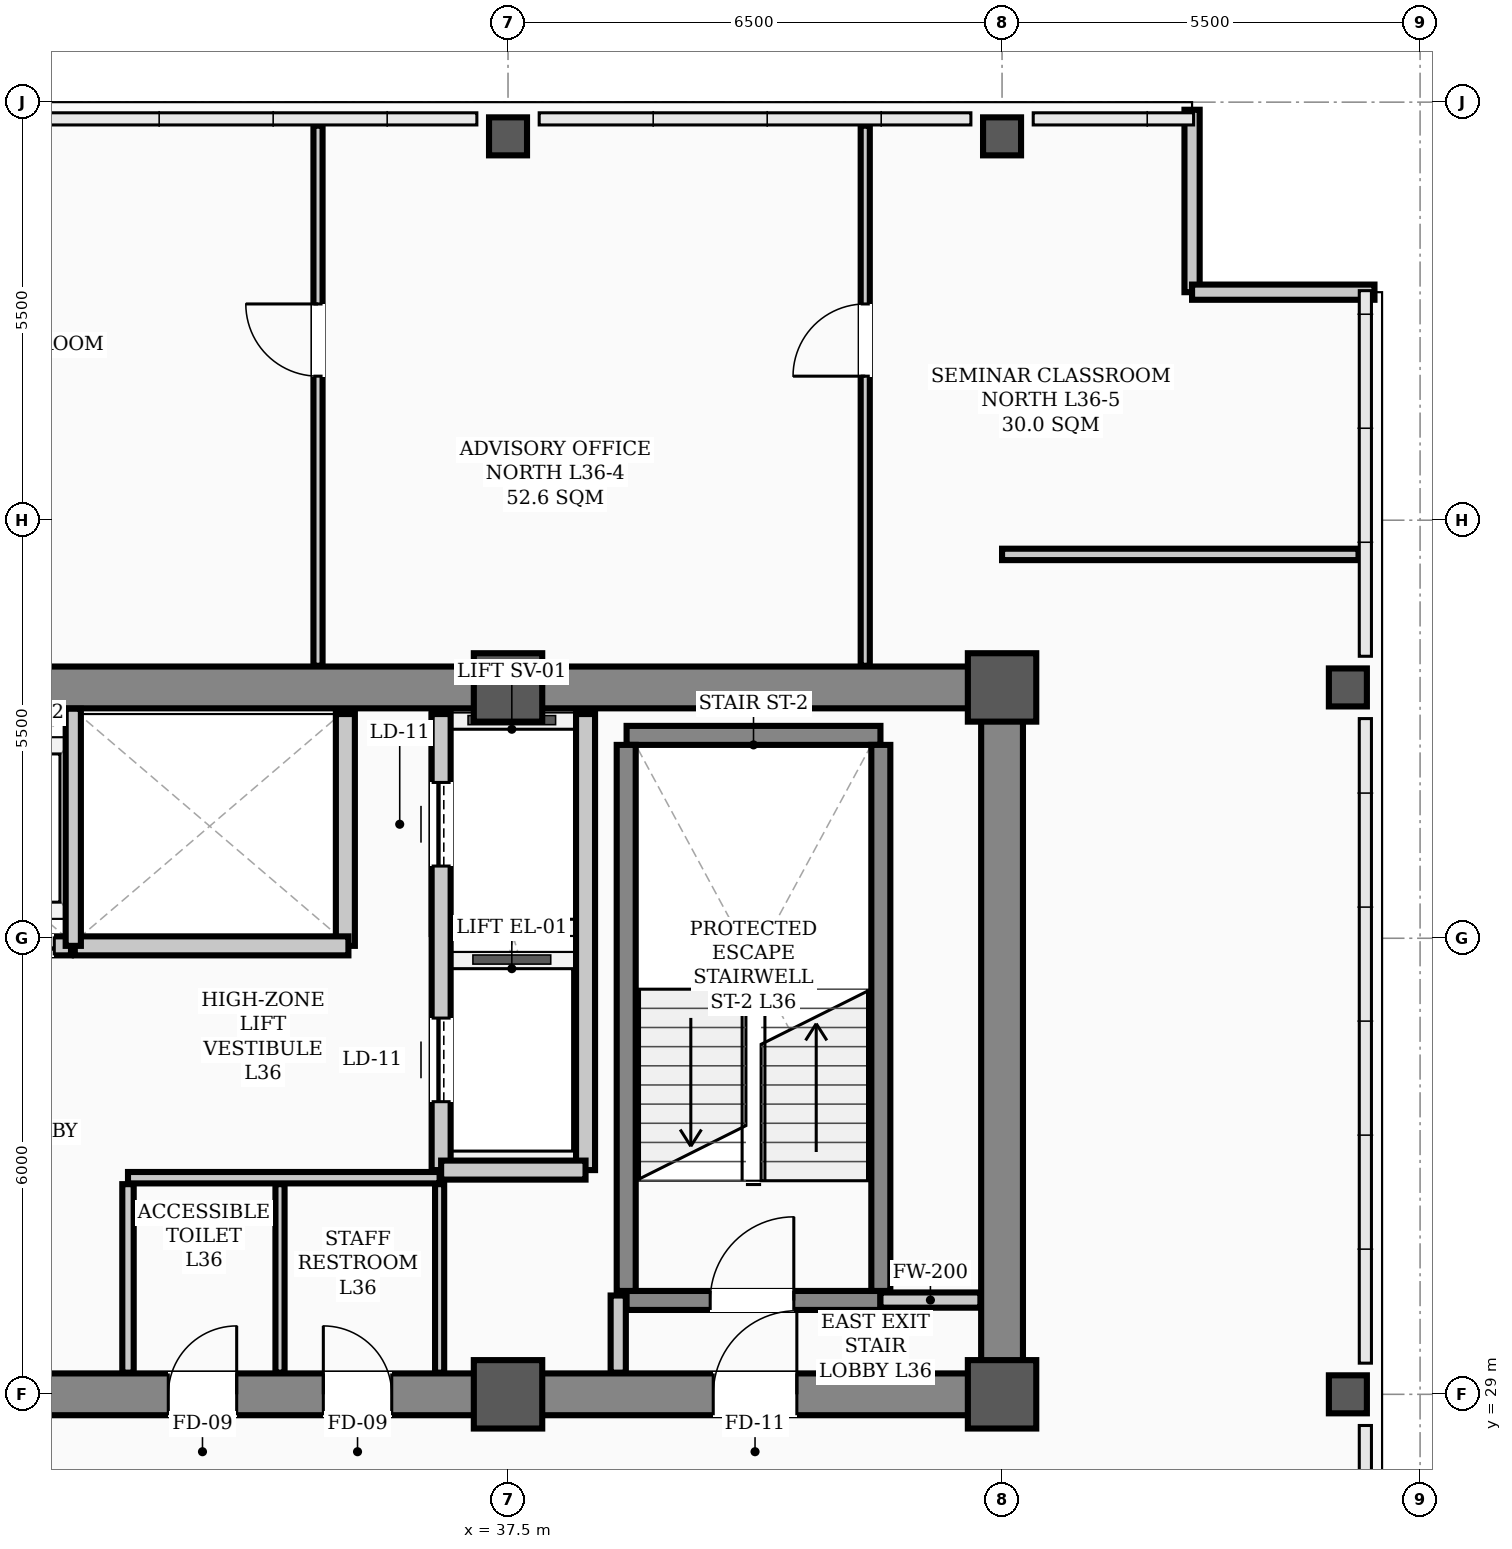
"""IFC4 building model, lengths in metres.
Left out: names, types, materials, properties, quantities, classifications, styles, units other than length and angle.
Written with IfcOpenShell. Run it as: python <this file> out.ifc"""

import sys

from ifc_helpers import new_model, si_unit, direction, frame, frame_2d, origin, origin_2d, place, context, subcontext, project, spatial, rectangle, hollow_rectangle, extrude, element, fill, save


model = new_model("IFC4")
c1 = context("Model", 3, precision=1e-05, world=origin(), true_north=direction((0.0, 1.0)))
c2 = subcontext(c1, "Body", "Model", "MODEL_VIEW")
j1 = project(units=[si_unit("LENGTHUNIT", "METRE"), si_unit("PLANEANGLEUNIT", "RADIAN")], contexts=[c1])
p1 = place(None, origin())
s1 = spatial("IfcSite", under=j1, at=p1, CompositionType="ELEMENT")
p2 = place(p1, origin())
s2 = spatial("IfcBuilding", under=s1, at=p2, CompositionType="ELEMENT")
p3 = place(p2, frame((0.0, 0.0, 146.1)))
s3 = spatial("IfcBuildingStorey", under=s2, at=p3, CompositionType="ELEMENT", Elevation=146.1)
for number, where, z_axis, x_axis in (
    (1, (37.5, 29.0, 0.0), (0.0, 0.0, 1.0), (1.0, 0.0, 0.0)),
    (2, (37.5, 38.3, 0.0), (0.0, 0.0, 1.0), (1.0, 0.0, 0.0)),
    (3, (44.0, 29.0, 0.0), (0.0, 0.0, 1.0), (1.0, 0.0, 0.0)),
    (4, (44.0, 38.3, 0.0), (0.0, 0.0, 1.0), (1.0, 0.0, 0.0)),
):
    element("IfcColumn", number, at=place(p3, frame(where, z_axis=z_axis, x_axis=x_axis)), inside=s3, PredefinedType="COLUMN", context=c2, shape_type="SweptSolid", body=[
        extrude(hollow_rectangle(XDim=0.9, YDim=0.9, WallThickness=0.035, InnerFilletRadius=0.017, OuterFilletRadius=0.052, at=origin_2d()), origin(), (0.0, 0.0, 1.0), 3.9),
    ])
for number, where, z_axis, x_axis in (
    (5, (37.5, 45.55, 0.0), (0.0, 0.0, 1.0), (1.0, 0.0, 0.0)),
    (6, (44.0, 45.55, 0.0), (0.0, 0.0, 1.0), (1.0, 0.0, 0.0)),
    (7, (48.55, 29.0, 0.0), (0.0, 0.0, 1.0), (1.0, 0.0, 0.0)),
    (8, (48.55, 38.3, 0.0), (0.0, 0.0, 1.0), (1.0, 0.0, 0.0)),
):
    element("IfcColumn", number, at=place(p3, frame(where, z_axis=z_axis, x_axis=x_axis)), inside=s3, PredefinedType="COLUMN", context=c2, shape_type="SweptSolid", body=[
        extrude(hollow_rectangle(XDim=0.5, YDim=0.5, WallThickness=0.024, InnerFilletRadius=0.012, OuterFilletRadius=0.036, at=origin_2d()), origin(), (0.0, 0.0, 1.0), 3.9),
    ])
for number, where, z_axis, x_axis in (
    (9, (46.5, 45.9, 0.0), (0.0, 0.0, 1.0), (0.0, -1.0, 0.0)),
    (10, (46.5, 43.5, 0.0), (0.0, 0.0, 1.0), (1.0, 0.0, 0.0)),
):
    element("IfcWall", number, at=place(p3, frame(where, z_axis=z_axis, x_axis=x_axis)), inside=s3, PredefinedType="PARAPET", context=c2, shape_type="SweptSolid", body=[
        extrude(rectangle(XDim=2.4, YDim=0.2, at=frame_2d((1.2, 0.0))), origin(), (0.0, 0.0, 1.0), 1.2),
    ])
p4 = place(p3, frame((13.5, 29.0, 0.0), z_axis=(0.0, 0.0, 1.0), x_axis=(1.0, 0.0, 0.0)))
e11 = element("IfcWall", 11, at=p4, inside=s3, PredefinedType="SHEAR", context=c2, shape_type="SweptSolid", body=[
    extrude(rectangle(XDim=30.5, YDim=0.55, at=frame_2d((15.25, 0.0))), origin(), (0.0, 0.0, 1.0), 3.72),
])
p5 = place(p4, frame((1.75, 0.0, 0.0)))
e12 = element("IfcOpeningElement", 12, at=p5, cuts=e11, PredefinedType="OPENING", context=c2, shape_type="SweptSolid", body=[
    extrude(rectangle(XDim=1.1, YDim=2.08, at=frame_2d((0.55, 1.04))), frame((0.0, 0.285, 0.0), z_axis=(0.0, -1.0, 0.0), x_axis=(1.0, 0.0, 0.0)), (0.0, 0.0, 1.0), 0.57),
])
p6 = place(p4, frame((26.7, 0.0, 0.0)))
e13 = element("IfcOpeningElement", 13, at=p6, cuts=e11, PredefinedType="OPENING", context=c2, shape_type="SweptSolid", body=[
    extrude(rectangle(XDim=1.1, YDim=2.08, at=frame_2d((0.55, 1.04))), frame((0.0, 0.285, 0.0), z_axis=(0.0, -1.0, 0.0), x_axis=(1.0, 0.0, 0.0)), (0.0, 0.0, 1.0), 0.57),
])
p7 = place(p4, frame((6.8, 0.0, 0.0)))
e14 = element("IfcOpeningElement", 14, at=p7, cuts=e11, PredefinedType="OPENING", context=c2, shape_type="SweptSolid", body=[
    extrude(rectangle(XDim=1.1, YDim=2.08, at=frame_2d((0.55, 1.04))), frame((0.0, 0.285, 0.0), z_axis=(0.0, -1.0, 0.0), x_axis=(1.0, 0.0, 0.0)), (0.0, 0.0, 1.0), 0.57),
])
p8 = place(p4, frame((13.2, 0.0, 0.0)))
e15 = element("IfcOpeningElement", 15, at=p8, cuts=e11, PredefinedType="OPENING", context=c2, shape_type="SweptSolid", body=[
    extrude(rectangle(XDim=1.6, YDim=2.08, at=frame_2d((0.8, 1.04))), frame((0.0, 0.285, 0.0), z_axis=(0.0, -1.0, 0.0), x_axis=(1.0, 0.0, 0.0)), (0.0, 0.0, 1.0), 0.57),
])
p9 = place(p4, frame((19.53, 0.0, 0.0)))
e16 = element("IfcOpeningElement", 16, at=p9, cuts=e11, PredefinedType="OPENING", context=c2, shape_type="SweptSolid", body=[
    extrude(rectangle(XDim=0.9, YDim=2.08, at=frame_2d((0.45, 1.04))), frame((0.0, 0.285, 0.0), z_axis=(0.0, -1.0, 0.0), x_axis=(1.0, 0.0, 0.0)), (0.0, 0.0, 1.0), 0.57),
])
p10 = place(p4, frame((21.57, 0.0, 0.0)))
e17 = element("IfcOpeningElement", 17, at=p10, cuts=e11, PredefinedType="OPENING", context=c2, shape_type="SweptSolid", body=[
    extrude(rectangle(XDim=0.9, YDim=2.08, at=frame_2d((0.45, 1.04))), frame((0.0, 0.285, 0.0), z_axis=(0.0, -1.0, 0.0), x_axis=(1.0, 0.0, 0.0)), (0.0, 0.0, 1.0), 0.57),
])
p11 = place(p3, frame((13.5, 38.3, 0.0), z_axis=(0.0, 0.0, 1.0), x_axis=(1.0, 0.0, 0.0)))
e18 = element("IfcWall", 18, at=p11, inside=s3, PredefinedType="SHEAR", context=c2, shape_type="SweptSolid", body=[
    extrude(rectangle(XDim=30.5, YDim=0.55, at=frame_2d((15.25, 0.0))), origin(), (0.0, 0.0, 1.0), 3.72),
])
p12 = place(p3, frame((44.0, 29.35, 0.0), z_axis=(0.0, 0.0, 1.0), x_axis=(0.0, 1.0, 0.0)))
e19 = element("IfcWall", 19, at=p12, inside=s3, PredefinedType="SHEAR", context=c2, shape_type="SweptSolid", body=[
    extrude(rectangle(XDim=8.6, YDim=0.55, at=frame_2d((4.3, 0.0))), origin(), (0.0, 0.0, 1.0), 3.72),
])
p13 = place(p3, frame((39.06, 30.235, 0.0), z_axis=(0.0, 0.0, 1.0), x_axis=(1.0, 0.0, 0.0)))
e20 = element("IfcWall", 20, at=p13, inside=s3, PredefinedType="STANDARD", context=c2, shape_type="SweptSolid", body=[
    extrude(rectangle(XDim=3.34, YDim=0.25, at=frame_2d((1.67, 0.0))), origin(), (0.0, 0.0, 1.0), 3.72),
])
p14 = place(p13, frame((1.1, 0.0, 0.0)))
e21 = element("IfcOpeningElement", 21, at=p14, cuts=e20, PredefinedType="OPENING", context=c2, shape_type="SweptSolid", body=[
    extrude(rectangle(XDim=1.1, YDim=2.08, at=frame_2d((0.55, 1.04))), frame((0.0, 0.135, 0.0), z_axis=(0.0, -1.0, 0.0), x_axis=(1.0, 0.0, 0.0)), (0.0, 0.0, 1.0), 0.27),
])
p15 = place(p3, frame((39.06, 37.669, 0.0), z_axis=(0.0, 0.0, 1.0), x_axis=(1.0, 0.0, 0.0)))
e22 = element("IfcWall", 22, at=p15, inside=s3, PredefinedType="STANDARD", context=c2, shape_type="SweptSolid", body=[
    extrude(rectangle(XDim=3.34, YDim=0.25, at=frame_2d((1.67, 0.0))), origin(), (0.0, 0.0, 1.0), 3.72),
])
for number, where, z_axis, x_axis in (
    (23, (39.055, 30.36, 0.0), (0.0, 0.0, 1.0), (0.0, 1.0, 0.0)),
    (24, (42.405, 30.36, 0.0), (0.0, 0.0, 1.0), (0.0, 1.0, 0.0)),
):
    element("IfcWall", number, at=place(p3, frame(where, z_axis=z_axis, x_axis=x_axis)), inside=s3, PredefinedType="STANDARD", context=c2, shape_type="SweptSolid", body=[
        extrude(rectangle(XDim=7.184, YDim=0.25, at=frame_2d((3.592, 0.0))), origin(), (0.0, 0.0, 1.0), 3.72),
    ])
p16 = place(p3, frame((36.62, 31.95, 0.0), z_axis=(0.0, 0.0, 1.0), x_axis=(0.0, 1.0, 0.0)))
e25 = element("IfcWall", 25, at=p16, inside=s3, PredefinedType="STANDARD", context=c2, shape_type="SweptSolid", body=[
    extrude(rectangle(XDim=6.0, YDim=0.25, at=frame_2d((3.0, 0.0))), origin(), (0.0, 0.0, 1.0), 3.35),
])
p17 = place(p16, frame((0.9, 0.0, 0.0)))
e26 = element("IfcOpeningElement", 26, at=p17, cuts=e25, PredefinedType="OPENING", context=c2, shape_type="SweptSolid", body=[
    extrude(rectangle(XDim=1.1, YDim=2.08, at=frame_2d((0.55, 1.04))), frame((0.0, 0.135, 0.0), z_axis=(0.0, -1.0, 0.0), x_axis=(1.0, 0.0, 0.0)), (0.0, 0.0, 1.0), 0.27),
])
p18 = place(p16, frame((4.0, 0.0, 0.0)))
e27 = element("IfcOpeningElement", 27, at=p18, cuts=e25, PredefinedType="OPENING", context=c2, shape_type="SweptSolid", body=[
    extrude(rectangle(XDim=1.1, YDim=2.08, at=frame_2d((0.55, 1.04))), frame((0.0, 0.135, 0.0), z_axis=(0.0, -1.0, 0.0), x_axis=(1.0, 0.0, 0.0)), (0.0, 0.0, 1.0), 0.27),
])
p19 = place(p3, frame((38.52, 31.95, 0.0), z_axis=(0.0, 0.0, 1.0), x_axis=(0.0, 1.0, 0.0)))
e28 = element("IfcWall", 28, at=p19, inside=s3, PredefinedType="STANDARD", context=c2, shape_type="SweptSolid", body=[
    extrude(rectangle(XDim=6.0, YDim=0.25, at=frame_2d((3.0, 0.0))), origin(), (0.0, 0.0, 1.0), 3.35),
])
p20 = place(p3, frame((36.62, 31.95, 0.0), z_axis=(0.0, 0.0, 1.0), x_axis=(1.0, 0.0, 0.0)))
e29 = element("IfcWall", 29, at=p20, inside=s3, PredefinedType="STANDARD", context=c2, shape_type="SweptSolid", body=[
    extrude(rectangle(XDim=1.9, YDim=0.25, at=frame_2d((0.95, 0.0))), origin(), (0.0, 0.0, 1.0), 3.48),
])
p21 = place(p3, frame((35.36, 34.9, 0.0), z_axis=(0.0, 0.0, 1.0), x_axis=(0.0, 1.0, 0.0)))
e30 = element("IfcWall", 30, at=p21, inside=s3, PredefinedType="STANDARD", context=c2, shape_type="SweptSolid", body=[
    extrude(rectangle(XDim=3.05, YDim=0.25, at=frame_2d((1.525, 0.0))), origin(), (0.0, 0.0, 1.0), 3.35),
])
p22 = place(p3, frame((28.2, 34.9, 0.0), z_axis=(0.0, 0.0, 1.0), x_axis=(1.0, 0.0, 0.0)))
e31 = element("IfcWall", 31, at=p22, inside=s3, PredefinedType="STANDARD", context=c2, shape_type="SweptSolid", body=[
    extrude(rectangle(XDim=3.55, YDim=0.25, at=frame_2d((1.775, 0.0))), origin(), (0.0, 0.0, 1.0), 3.72),
])
p23 = place(p22, frame((0.23, 0.0, 0.0)))
e32 = element("IfcOpeningElement", 32, at=p23, cuts=e31, PredefinedType="OPENING", context=c2, shape_type="SweptSolid", body=[
    extrude(rectangle(XDim=1.3, YDim=2.08, at=frame_2d((0.65, 1.04))), frame((0.0, 0.135, 0.0), z_axis=(0.0, -1.0, 0.0), x_axis=(1.0, 0.0, 0.0)), (0.0, 0.0, 1.0), 0.27),
])
p24 = place(p22, frame((2.03, 0.0, 0.0)))
e33 = element("IfcOpeningElement", 33, at=p24, cuts=e31, PredefinedType="OPENING", context=c2, shape_type="SweptSolid", body=[
    extrude(rectangle(XDim=1.3, YDim=2.08, at=frame_2d((0.65, 1.04))), frame((0.0, 0.135, 0.0), z_axis=(0.0, -1.0, 0.0), x_axis=(1.0, 0.0, 0.0)), (0.0, 0.0, 1.0), 0.27),
])
p25 = place(p3, frame((31.8, 34.9, 0.0), z_axis=(0.0, 0.0, 1.0), x_axis=(1.0, 0.0, 0.0)))
e34 = element("IfcWall", 34, at=p25, inside=s3, PredefinedType="STANDARD", context=c2, shape_type="SweptSolid", body=[
    extrude(rectangle(XDim=3.6, YDim=0.25, at=frame_2d((1.8, 0.0))), origin(), (0.0, 0.0, 1.0), 3.72),
])
p26 = place(p3, frame((42.4, 30.24, 0.0), z_axis=(0.0, 0.0, 1.0), x_axis=(1.0, 0.0, 0.0)))
e35 = element("IfcWall", 35, at=p26, inside=s3, PredefinedType="STANDARD", context=c2, shape_type="SweptSolid", body=[
    extrude(rectangle(XDim=1.315, YDim=0.2, at=frame_2d((0.658, 0.0))), origin(), (0.0, 0.0, 1.0), 3.2),
])
p27 = place(p3, frame((32.5, 31.85, 0.0), z_axis=(0.0, 0.0, 1.0), x_axis=(1.0, 0.0, 0.0)))
e36 = element("IfcWall", 36, at=p27, inside=s3, PredefinedType="PARTITIONING", context=c2, shape_type="SweptSolid", body=[
    extrude(rectangle(XDim=4.1, YDim=0.15, at=frame_2d((2.05, 0.0))), origin(), (0.0, 0.0, 1.0), 3.72),
])
p28 = place(p3, frame((44.0, 40.05, 0.0), z_axis=(0.0, 0.0, 1.0), x_axis=(1.0, 0.0, 0.0)))
e37 = element("IfcWall", 37, at=p28, inside=s3, PredefinedType="PARTITIONING", context=c2, shape_type="SweptSolid", body=[
    extrude(rectangle(XDim=4.69, YDim=0.15, at=frame_2d((2.345, 0.0))), origin(), (0.0, 0.0, 1.0), 3.2),
])
p29 = place(p3, frame((38.95, 29.285, 0.0), z_axis=(0.0, 0.0, 1.0), x_axis=(0.0, 1.0, 0.0)))
e38 = element("IfcWall", 38, at=p29, inside=s3, PredefinedType="STANDARD", context=c2, shape_type="SweptSolid", body=[
    extrude(rectangle(XDim=1.015, YDim=0.2, at=frame_2d((0.508, 0.0))), origin(), (0.0, 0.0, 1.0), 3.35),
])
p30 = place(p3, frame((32.5, 29.285, 0.0), z_axis=(0.0, 0.0, 1.0), x_axis=(0.0, 1.0, 0.0)))
e39 = element("IfcWall", 39, at=p30, inside=s3, PredefinedType="PARTITIONING", context=c2, shape_type="SweptSolid", body=[
    extrude(rectangle(XDim=2.48, YDim=0.15, at=frame_2d((1.24, 0.0))), origin(), (0.0, 0.0, 1.0), 3.35),
])
for number, where, z_axis, x_axis in (
    (40, (36.6, 29.285, 0.0), (0.0, 0.0, 1.0), (0.0, 1.0, 0.0)),
    (41, (34.5, 29.285, 0.0), (0.0, 0.0, 1.0), (0.0, 1.0, 0.0)),
):
    element("IfcWall", number, at=place(p3, frame(where, z_axis=z_axis, x_axis=x_axis)), inside=s3, PredefinedType="PARTITIONING", context=c2, shape_type="SweptSolid", body=[
        extrude(rectangle(XDim=2.48, YDim=0.12, at=frame_2d((1.24, 0.0))), origin(), (0.0, 0.0, 1.0), 3.35),
    ])
p31 = place(p3, frame((35.0, 38.585, 0.0), z_axis=(0.0, 0.0, 1.0), x_axis=(0.0, 1.0, 0.0)))
e42 = element("IfcWall", 42, at=p31, inside=s3, PredefinedType="PARTITIONING", context=c2, shape_type="SweptSolid", body=[
    extrude(rectangle(XDim=7.105, YDim=0.12, at=frame_2d((3.552, 0.0))), origin(), (0.0, 0.0, 1.0), 3.212),
])
p32 = place(p31, frame((3.81, 0.0, 0.0)))
e43 = element("IfcOpeningElement", 43, at=p32, cuts=e42, PredefinedType="OPENING", context=c2, shape_type="SweptSolid", body=[
    extrude(rectangle(XDim=0.95, YDim=2.08, at=frame_2d((0.475, 1.04))), frame((0.0, 0.07, 0.0), z_axis=(0.0, -1.0, 0.0), x_axis=(1.0, 0.0, 0.0)), (0.0, 0.0, 1.0), 0.14),
])
p33 = place(p3, frame((42.2, 38.585, 0.0), z_axis=(0.0, 0.0, 1.0), x_axis=(0.0, 1.0, 0.0)))
e44 = element("IfcWall", 44, at=p33, inside=s3, PredefinedType="PARTITIONING", context=c2, shape_type="SweptSolid", body=[
    extrude(rectangle(XDim=7.105, YDim=0.12, at=frame_2d((3.552, 0.0))), origin(), (0.0, 0.0, 1.0), 3.212),
])
p34 = place(p33, frame((3.81, 0.0, 0.0)))
e45 = element("IfcOpeningElement", 45, at=p34, cuts=e44, PredefinedType="OPENING", context=c2, shape_type="SweptSolid", body=[
    extrude(rectangle(XDim=0.95, YDim=2.08, at=frame_2d((0.475, 1.04))), frame((0.0, 0.07, 0.0), z_axis=(0.0, -1.0, 0.0), x_axis=(1.0, 0.0, 0.0)), (0.0, 0.0, 1.0), 0.14),
])
p35 = place(p3, frame((31.78, 34.9, 0.0), z_axis=(0.0, 0.0, 1.0), x_axis=(0.0, 1.0, 0.0)))
e46 = element("IfcWall", 46, at=p35, inside=s3, PredefinedType="STANDARD", context=c2, shape_type="SweptSolid", body=[
    extrude(rectangle(XDim=3.12, YDim=0.2, at=frame_2d((1.56, 0.0))), origin(), (0.0, 0.0, 1.0), 3.35),
])
p36 = place(p14, origin())
e47 = element("IfcDoor", 47, at=p36, inside=s3, OperationType="SINGLE_SWING_RIGHT", PredefinedType="DOOR", context=c2, shape_type="SweptSolid", body=[
    extrude(rectangle(XDim=1.1, YDim=2.08, at=frame_2d((0.55, 1.04))), frame((0.0, 0.025, 0.0), z_axis=(0.0, -1.0, 0.0), x_axis=(1.0, 0.0, 0.0)), (0.0, 0.0, 1.0), 0.05),
])
fill(e21, e47)
p37 = place(p6, origin())
e48 = element("IfcDoor", 48, at=p37, inside=s3, OperationType="SINGLE_SWING_RIGHT", PredefinedType="DOOR", context=c2, shape_type="SweptSolid", body=[
    extrude(rectangle(XDim=1.1, YDim=2.08, at=frame_2d((0.55, 1.04))), frame((0.0, 0.025, 0.0), z_axis=(0.0, -1.0, 0.0), x_axis=(1.0, 0.0, 0.0)), (0.0, 0.0, 1.0), 0.05),
])
fill(e13, e48)
p38 = place(p9, origin())
e49 = element("IfcDoor", 49, at=p38, inside=s3, OperationType="SINGLE_SWING_RIGHT", PredefinedType="DOOR", context=c2, shape_type="SweptSolid", body=[
    extrude(rectangle(XDim=0.9, YDim=2.08, at=frame_2d((0.45, 1.04))), frame((0.0, 0.025, 0.0), z_axis=(0.0, -1.0, 0.0), x_axis=(1.0, 0.0, 0.0)), (0.0, 0.0, 1.0), 0.05),
])
fill(e16, e49)
p39 = place(p10, origin())
e50 = element("IfcDoor", 50, at=p39, inside=s3, OperationType="SINGLE_SWING_LEFT", PredefinedType="DOOR", context=c2, shape_type="SweptSolid", body=[
    extrude(rectangle(XDim=0.9, YDim=2.08, at=frame_2d((0.45, 1.04))), frame((0.0, 0.025, 0.0), z_axis=(0.0, -1.0, 0.0), x_axis=(1.0, 0.0, 0.0)), (0.0, 0.0, 1.0), 0.05),
])
fill(e17, e50)
p40 = place(p32, origin())
e51 = element("IfcDoor", 51, at=p40, inside=s3, OperationType="SINGLE_SWING_RIGHT", PredefinedType="DOOR", context=c2, shape_type="SweptSolid", body=[
    extrude(rectangle(XDim=0.95, YDim=2.08, at=frame_2d((0.475, 1.04))), frame((0.0, 0.025, 0.0), z_axis=(0.0, -1.0, 0.0), x_axis=(1.0, 0.0, 0.0)), (0.0, 0.0, 1.0), 0.05),
])
fill(e43, e51)
p41 = place(p34, origin())
e52 = element("IfcDoor", 52, at=p41, inside=s3, OperationType="SINGLE_SWING_LEFT", PredefinedType="DOOR", context=c2, shape_type="SweptSolid", body=[
    extrude(rectangle(XDim=0.95, YDim=2.08, at=frame_2d((0.475, 1.04))), frame((0.0, 0.025, 0.0), z_axis=(0.0, -1.0, 0.0), x_axis=(1.0, 0.0, 0.0)), (0.0, 0.0, 1.0), 0.05),
])
fill(e45, e52)
p42 = place(p17, origin())
e53 = element("IfcDoor", 53, at=p42, inside=s3, OperationType="SLIDING_TO_LEFT", PredefinedType="DOOR", context=c2, shape_type="SweptSolid", body=[
    extrude(rectangle(XDim=1.1, YDim=2.08, at=frame_2d((0.55, 1.04))), frame((0.0, 0.025, 0.0), z_axis=(0.0, -1.0, 0.0), x_axis=(1.0, 0.0, 0.0)), (0.0, 0.0, 1.0), 0.05),
])
fill(e26, e53)
p43 = place(p18, origin())
e54 = element("IfcDoor", 54, at=p43, inside=s3, OperationType="SLIDING_TO_LEFT", PredefinedType="DOOR", context=c2, shape_type="SweptSolid", body=[
    extrude(rectangle(XDim=1.1, YDim=2.08, at=frame_2d((0.55, 1.04))), frame((0.0, 0.025, 0.0), z_axis=(0.0, -1.0, 0.0), x_axis=(1.0, 0.0, 0.0)), (0.0, 0.0, 1.0), 0.05),
])
fill(e27, e54)
p44 = place(p24, origin())
e55 = element("IfcDoor", 55, at=p44, inside=s3, OperationType="DOUBLE_DOOR_SLIDING", PredefinedType="DOOR", context=c2, shape_type="SweptSolid", body=[
    extrude(rectangle(XDim=1.3, YDim=2.08, at=frame_2d((0.65, 1.04))), frame((0.0, 0.025, 0.0), z_axis=(0.0, -1.0, 0.0), x_axis=(1.0, 0.0, 0.0)), (0.0, 0.0, 1.0), 0.05),
])
fill(e33, e55)
save(model, sys.argv[1])
